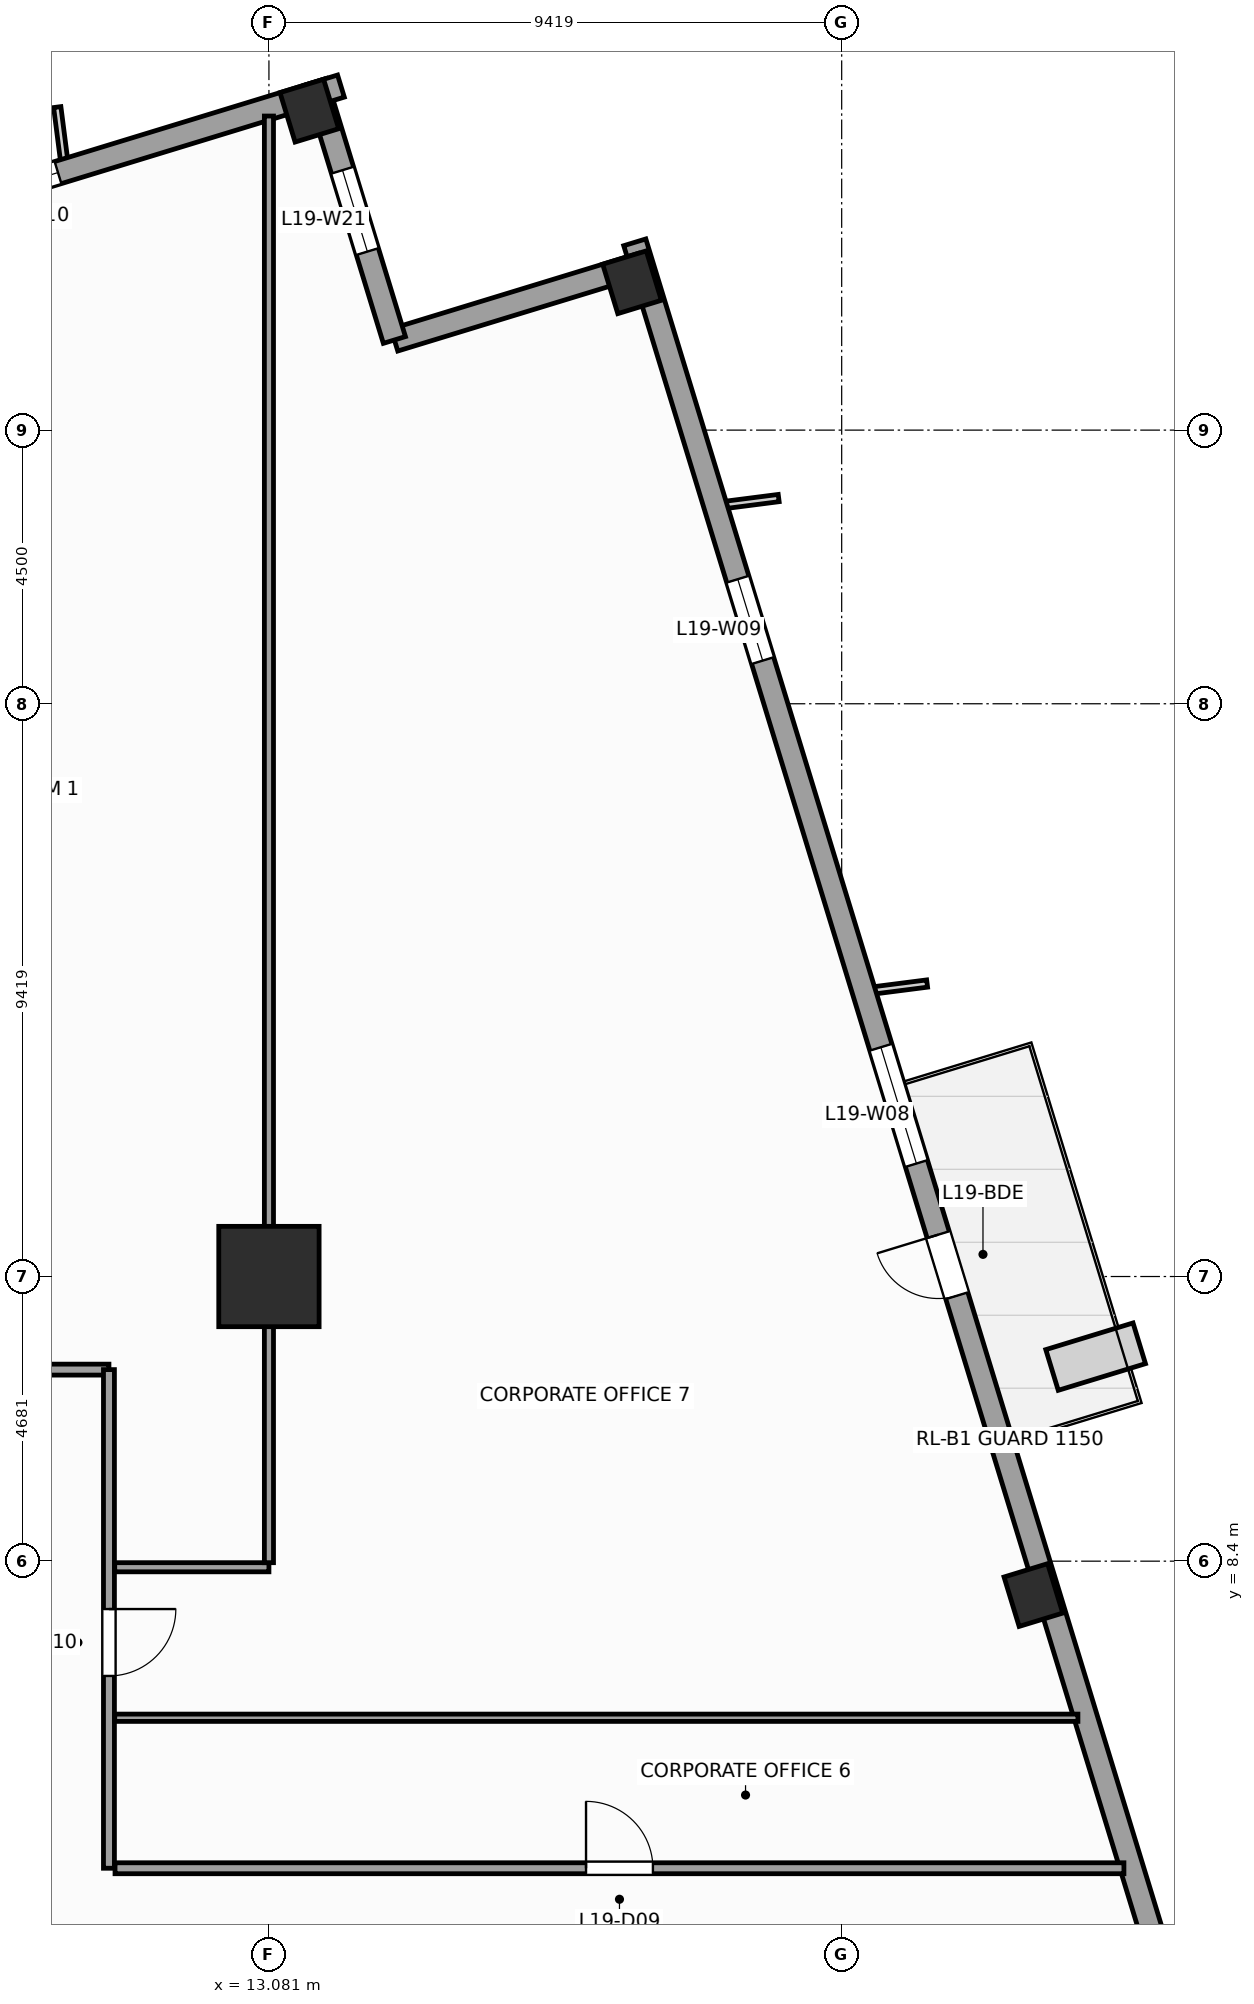
"""IFC4 building model, lengths in metres.
Left out: names, types, materials, properties, quantities, classifications, styles, units other than length and angle.
Written with IfcOpenShell. Run it as: python <this file> out.ifc"""

import sys

from ifc_helpers import new_model, si_unit, direction, frame, frame_2d, origin, origin_2d, place, context, subcontext, project, spatial, rectangle, extrude, source, transform, mapped, element, fill, save


model = new_model("IFC4")
c1 = context("Model", 3, precision=1e-05, world=origin(), true_north=direction((0.0, 1.0)))
c2 = subcontext(c1, "Body", "Model", "MODEL_VIEW")
j1 = project(units=[si_unit("LENGTHUNIT", "METRE"), si_unit("PLANEANGLEUNIT", "RADIAN")], contexts=[c1])
p1 = place(None, origin())
s1 = spatial("IfcSite", under=j1, at=p1, CompositionType="ELEMENT")
p2 = place(p1, origin())
s2 = spatial("IfcBuilding", under=s1, at=p2, CompositionType="ELEMENT")
p3 = place(p2, frame((0.0, 0.0, 83.2)))
s3 = spatial("IfcBuildingStorey", under=s2, at=p3, CompositionType="ELEMENT", Elevation=83.2)
m1 = source(origin(), c2, "Body", "SweptSolid", [
    extrude(rectangle(XDim=1.65, YDim=1.65, at=origin_2d()), origin(), (0.0, 0.0, 1.0), 4.0),
])
p4 = place(p3, frame((13.081, 13.081, 0.0), z_axis=(0.0, 0.0, 1.0), x_axis=(1.0, 0.0, 0.0)))
e1 = element("IfcColumn", 1, at=p4, inside=s3, PredefinedType="COLUMN", context=c2, shape_type="MappedRepresentation", body=[
    mapped(m1, transform((0.0, 0.0, 0.0), scale=1.0)),
])
m2 = source(origin(), c2, "Body", "SweptSolid", [
    extrude(rectangle(XDim=0.75, YDim=0.85, at=origin_2d()), origin(), (0.0, 0.0, 1.0), 4.0),
])
for number, where, z_axis, x_axis in (
    (2, (25.653, 7.843, 0.0), (0.0, 0.0, 1.0), (0.956, 0.292, 0.0)),
    (3, (19.052, 29.431, 0.0), (0.0, 0.0, 1.0), (0.956, 0.292, 0.0)),
    (4, (13.746, 32.253, 0.0), (0.0, 0.0, 1.0), (0.956, 0.292, 0.0)),
):
    element("IfcColumn", number, at=place(p3, frame(where, z_axis=z_axis, x_axis=x_axis)), inside=s3, PredefinedType="COLUMN", context=c2, shape_type="MappedRepresentation", body=[
        mapped(m2, transform((0.0, 0.0, 0.0), scale=1.0)),
    ])
p5 = place(p3, frame((32.658, -14.265, 0.0), z_axis=(0.0, 0.0, 1.0), x_axis=(-0.292373127906, 0.956304320851, 0.0)))
e5 = element("IfcWall", 5, at=p5, inside=s3, PredefinedType="STANDARD", context=c2, shape_type="SweptSolid", body=[
    extrude(rectangle(XDim=46.38, YDim=0.38, at=frame_2d((23.19, 0.0))), origin(), (0.0, 0.0, 1.0), 3.14),
])
p6 = place(p5, frame((28.265, 0.0, 0.0)))
e6 = element("IfcOpeningElement", 6, at=p6, cuts=e5, PredefinedType="OPENING", context=c2, shape_type="SweptSolid", body=[
    extrude(rectangle(XDim=1.05, YDim=2.25, at=frame_2d((0.525, 1.125))), frame((0.0, 0.2, 0.0), z_axis=(0.0, -1.0, 0.0), x_axis=(1.0, 0.0, 0.0)), (0.0, 0.0, 1.0), 0.4),
])
p7 = place(p5, frame((4.865, 0.0, 0.51)))
e7 = element("IfcOpeningElement", 7, at=p7, cuts=e5, PredefinedType="OPENING", context=c2, shape_type="SweptSolid", body=[
    extrude(rectangle(XDim=1.4, YDim=2.4, at=frame_2d((0.7, 1.2))), frame((0.0, 0.2, 0.0), z_axis=(0.0, -1.0, 0.0), x_axis=(1.0, 0.0, 0.0)), (0.0, 0.0, 1.0), 0.4),
])
p8 = place(p5, frame((12.45, 0.0, 0.51)))
e8 = element("IfcOpeningElement", 8, at=p8, cuts=e5, PredefinedType="OPENING", context=c2, shape_type="SweptSolid", body=[
    extrude(rectangle(XDim=2.0, YDim=2.4, at=frame_2d((1.0, 1.2))), frame((0.0, 0.2, 0.0), z_axis=(0.0, -1.0, 0.0), x_axis=(1.0, 0.0, 0.0)), (0.0, 0.0, 1.0), 0.4),
])
p9 = place(p5, frame((30.538, 0.0, 0.51)))
e9 = element("IfcOpeningElement", 9, at=p9, cuts=e5, PredefinedType="OPENING", context=c2, shape_type="SweptSolid", body=[
    extrude(rectangle(XDim=2.0, YDim=2.4, at=frame_2d((1.0, 1.2))), frame((0.0, 0.2, 0.0), z_axis=(0.0, -1.0, 0.0), x_axis=(1.0, 0.0, 0.0)), (0.0, 0.0, 1.0), 0.4),
])
p10 = place(p5, frame((39.187, 0.0, 0.51)))
e10 = element("IfcOpeningElement", 10, at=p10, cuts=e5, PredefinedType="OPENING", context=c2, shape_type="SweptSolid", body=[
    extrude(rectangle(XDim=1.4, YDim=2.4, at=frame_2d((0.7, 1.2))), frame((0.0, 0.2, 0.0), z_axis=(0.0, -1.0, 0.0), x_axis=(1.0, 0.0, 0.0)), (0.0, 0.0, 1.0), 0.4),
])
p11 = place(p3, frame((19.208, 29.725, 0.0), z_axis=(0.0, 0.0, 1.0), x_axis=(-0.956312764915, -0.292345507338, 0.0)))
e11 = element("IfcWall", 11, at=p11, inside=s3, PredefinedType="STANDARD", context=c2, shape_type="SweptSolid", body=[
    extrude(rectangle(XDim=4.25, YDim=0.38, at=frame_2d((2.125, 0.0))), origin(), (0.0, 0.0, 1.0), 3.74),
])
p12 = place(p3, frame((15.144, 28.482, 0.0), z_axis=(0.0, 0.0, 1.0), x_axis=(-0.292373601522, 0.956304176051, 0.0)))
e12 = element("IfcWall", 12, at=p12, inside=s3, PredefinedType="STANDARD", context=c2, shape_type="SweptSolid", body=[
    extrude(rectangle(XDim=4.44, YDim=0.38, at=frame_2d((2.22, 0.0))), origin(), (0.0, 0.0, 1.0), 3.04),
])
p13 = place(p12, frame((1.52, 0.0, 0.51)))
e13 = element("IfcOpeningElement", 13, at=p13, cuts=e12, PredefinedType="OPENING", context=c2, shape_type="SweptSolid", body=[
    extrude(rectangle(XDim=1.4, YDim=2.4, at=frame_2d((0.7, 1.2))), frame((0.0, 0.2, 0.0), z_axis=(0.0, -1.0, 0.0), x_axis=(1.0, 0.0, 0.0)), (0.0, 0.0, 1.0), 0.4),
])
p14 = place(p3, frame((14.265, 32.658, 0.0), z_axis=(0.0, 0.0, 1.0), x_axis=(-0.956304320851, -0.292373127906, 0.0)))
e14 = element("IfcWall", 14, at=p14, inside=s3, PredefinedType="STANDARD", context=c2, shape_type="SweptSolid", body=[
    extrude(rectangle(XDim=46.38, YDim=0.38, at=frame_2d((23.19, 0.0))), origin(), (0.0, 0.0, 1.0), 3.14),
])
p15 = place(p14, frame((4.865, 0.0, 0.51)))
e15 = element("IfcOpeningElement", 15, at=p15, cuts=e14, PredefinedType="OPENING", context=c2, shape_type="SweptSolid", body=[
    extrude(rectangle(XDim=1.4, YDim=2.4, at=frame_2d((0.7, 1.2))), frame((0.0, 0.2, 0.0), z_axis=(0.0, -1.0, 0.0), x_axis=(1.0, 0.0, 0.0)), (0.0, 0.0, 1.0), 0.4),
])
p16 = place(p14, frame((12.45, 0.0, 0.51)))
e16 = element("IfcOpeningElement", 16, at=p16, cuts=e14, PredefinedType="OPENING", context=c2, shape_type="SweptSolid", body=[
    extrude(rectangle(XDim=2.0, YDim=2.4, at=frame_2d((1.0, 1.2))), frame((0.0, 0.2, 0.0), z_axis=(0.0, -1.0, 0.0), x_axis=(1.0, 0.0, 0.0)), (0.0, 0.0, 1.0), 0.4),
])
p17 = place(p14, frame((19.012, 0.0, 0.51)))
e17 = element("IfcOpeningElement", 17, at=p17, cuts=e14, PredefinedType="OPENING", context=c2, shape_type="SweptSolid", body=[
    extrude(rectangle(XDim=2.0, YDim=2.4, at=frame_2d((1.0, 1.2))), frame((0.0, 0.2, 0.0), z_axis=(0.0, -1.0, 0.0), x_axis=(1.0, 0.0, 0.0)), (0.0, 0.0, 1.0), 0.4),
])
p18 = place(p14, frame((30.538, 0.0, 0.51)))
e18 = element("IfcOpeningElement", 18, at=p18, cuts=e14, PredefinedType="OPENING", context=c2, shape_type="SweptSolid", body=[
    extrude(rectangle(XDim=2.0, YDim=2.4, at=frame_2d((1.0, 1.2))), frame((0.0, 0.2, 0.0), z_axis=(0.0, -1.0, 0.0), x_axis=(1.0, 0.0, 0.0)), (0.0, 0.0, 1.0), 0.4),
])
p19 = place(p14, frame((39.187, 0.0, 0.51)))
e19 = element("IfcOpeningElement", 19, at=p19, cuts=e14, PredefinedType="OPENING", context=c2, shape_type="SweptSolid", body=[
    extrude(rectangle(XDim=1.4, YDim=2.4, at=frame_2d((0.7, 1.2))), frame((0.0, 0.2, 0.0), z_axis=(0.0, -1.0, 0.0), x_axis=(1.0, 0.0, 0.0)), (0.0, 0.0, 1.0), 0.4),
])
p20 = place(p3, frame((-12.6, 11.55, 0.0), z_axis=(0.0, 0.0, 1.0), x_axis=(1.0, 0.0, 0.0)))
e20 = element("IfcWall", 20, at=p20, inside=s3, PredefinedType="PARTITIONING", context=c2, shape_type="SweptSolid", body=[
    extrude(rectangle(XDim=23.05, YDim=0.18, at=frame_2d((11.525, 0.0))), origin(), (0.0, 0.0, 1.0), 3.74),
])
p21 = place(p20, frame((2.514, 0.0, 0.0)))
e21 = element("IfcOpeningElement", 21, at=p21, cuts=e20, PredefinedType="OPENING", context=c2, shape_type="SweptSolid", body=[
    extrude(rectangle(XDim=1.1, YDim=2.2, at=frame_2d((0.55, 1.1))), frame((0.0, 0.1, 0.0), z_axis=(0.0, -1.0, 0.0), x_axis=(1.0, 0.0, 0.0)), (0.0, 0.0, 1.0), 0.2),
])
p22 = place(p20, frame((8.05, 0.0, 0.0)))
e22 = element("IfcOpeningElement", 22, at=p22, cuts=e20, PredefinedType="OPENING", context=c2, shape_type="SweptSolid", body=[
    extrude(rectangle(XDim=1.1, YDim=2.2, at=frame_2d((0.55, 1.1))), frame((0.0, 0.1, 0.0), z_axis=(0.0, -1.0, 0.0), x_axis=(1.0, 0.0, 0.0)), (0.0, 0.0, 1.0), 0.2),
])
p23 = place(p20, frame((13.65, 0.0, 0.0)))
e23 = element("IfcOpeningElement", 23, at=p23, cuts=e20, PredefinedType="OPENING", context=c2, shape_type="SweptSolid", body=[
    extrude(rectangle(XDim=1.1, YDim=2.2, at=frame_2d((0.55, 1.1))), frame((0.0, 0.1, 0.0), z_axis=(0.0, -1.0, 0.0), x_axis=(1.0, 0.0, 0.0)), (0.0, 0.0, 1.0), 0.2),
])
p24 = place(p20, frame((19.311, 0.0, 0.0)))
e24 = element("IfcOpeningElement", 24, at=p24, cuts=e20, PredefinedType="OPENING", context=c2, shape_type="SweptSolid", body=[
    extrude(rectangle(XDim=1.1, YDim=2.2, at=frame_2d((0.55, 1.1))), frame((0.0, 0.1, 0.0), z_axis=(0.0, -1.0, 0.0), x_axis=(1.0, 0.0, 0.0)), (0.0, 0.0, 1.0), 0.2),
])
p25 = place(p3, frame((10.45, 3.35, 0.0), z_axis=(0.0, 0.0, 1.0), x_axis=(0.0, 1.0, 0.0)))
e25 = element("IfcWall", 25, at=p25, inside=s3, PredefinedType="PARTITIONING", context=c2, shape_type="SweptSolid", body=[
    extrude(rectangle(XDim=8.2, YDim=0.18, at=frame_2d((4.1, 0.0))), origin(), (0.0, 0.0, 1.0), 3.74),
])
p26 = place(p25, frame((3.163, 0.0, 0.0)))
e26 = element("IfcOpeningElement", 26, at=p26, cuts=e25, PredefinedType="OPENING", context=c2, shape_type="SweptSolid", body=[
    extrude(rectangle(XDim=1.1, YDim=2.2, at=frame_2d((0.55, 1.1))), frame((0.0, 0.1, 0.0), z_axis=(0.0, -1.0, 0.0), x_axis=(1.0, 0.0, 0.0)), (0.0, 0.0, 1.0), 0.2),
])
p27 = place(p3, frame((10.55, 3.35, 0.0), z_axis=(0.0, 0.0, 1.0), x_axis=(1.0, 0.0, 0.0)))
e27 = element("IfcWall", 27, at=p27, inside=s3, PredefinedType="PARTITIONING", context=c2, shape_type="SweptSolid", body=[
    extrude(rectangle(XDim=16.592, YDim=0.18, at=frame_2d((8.296, 0.0))), origin(), (0.0, 0.0, 1.0), 3.74),
])
p28 = place(p27, frame((7.746, 0.0, 0.0)))
e28 = element("IfcOpeningElement", 28, at=p28, cuts=e27, PredefinedType="OPENING", context=c2, shape_type="SweptSolid", body=[
    extrude(rectangle(XDim=1.1, YDim=2.2, at=frame_2d((0.55, 1.1))), frame((0.0, 0.1, 0.0), z_axis=(0.0, -1.0, 0.0), x_axis=(1.0, 0.0, 0.0)), (0.0, 0.0, 1.0), 0.2),
])
p29 = place(p3, frame((10.545, 8.3, 0.0), z_axis=(0.0, 0.0, 1.0), x_axis=(1.0, 0.0, 0.0)))
e29 = element("IfcWall", 29, at=p29, inside=s3, PredefinedType="PARTITIONING", context=c2, shape_type="SweptSolid", body=[
    extrude(rectangle(XDim=2.536, YDim=0.15, at=frame_2d((1.268, 0.0))), origin(), (0.0, 0.0, 1.0), 3.74),
])
p30 = place(p3, frame((13.081, 8.375, 0.0), z_axis=(0.0, 0.0, 1.0), x_axis=(0.0, 1.0, 0.0)))
e30 = element("IfcWall", 30, at=p30, inside=s3, PredefinedType="PARTITIONING", context=c2, shape_type="SweptSolid", body=[
    extrude(rectangle(XDim=23.79, YDim=0.15, at=frame_2d((11.895, 0.0))), origin(), (0.0, 0.0, 1.0), 2.732),
])
p31 = place(p3, frame((10.545, 5.825, 0.0), z_axis=(0.0, 0.0, 1.0), x_axis=(1.0, 0.0, 0.0)))
e31 = element("IfcWall", 31, at=p31, inside=s3, PredefinedType="PARTITIONING", context=c2, shape_type="SweptSolid", body=[
    extrude(rectangle(XDim=15.84, YDim=0.12, at=frame_2d((7.92, 0.0))), origin(), (0.0, 0.0, 1.0), 3.74),
])
m3 = source(origin(), c2, "Body", "SweptSolid", [
    extrude(rectangle(XDim=1.05, YDim=2.25, at=frame_2d((0.525, 1.125))), frame((0.0, 0.025, 0.0), z_axis=(0.0, -1.0, 0.0), x_axis=(1.0, 0.0, 0.0)), (0.0, 0.0, 1.0), 0.05),
])
p32 = place(p6, origin())
e32 = element("IfcDoor", 32, at=p32, inside=s3, OperationType="SINGLE_SWING_RIGHT", PredefinedType="DOOR", context=c2, shape_type="MappedRepresentation", body=[
    mapped(m3, transform((0.0, 0.0, 0.0), scale=1.0)),
])
fill(e6, e32)
m4 = source(origin(), c2, "Body", "SweptSolid", [
    extrude(rectangle(XDim=2.0, YDim=2.4, at=frame_2d((1.0, 1.2))), frame((0.0, 0.03, 0.0), z_axis=(0.0, -1.0, 0.0), x_axis=(1.0, 0.0, 0.0)), (0.0, 0.0, 1.0), 0.06),
])
p33 = place(p9, origin())
e33 = element("IfcWindow", 33, at=p33, inside=s3, PartitioningType="SINGLE_PANEL", PredefinedType="WINDOW", context=c2, shape_type="MappedRepresentation", body=[
    mapped(m4, transform((0.0, 0.0, 0.0), scale=1.0)),
])
fill(e9, e33)
m5 = source(origin(), c2, "Body", "SweptSolid", [
    extrude(rectangle(XDim=1.4, YDim=2.4, at=frame_2d((0.7, 1.2))), frame((0.0, 0.03, 0.0), z_axis=(0.0, -1.0, 0.0), x_axis=(1.0, 0.0, 0.0)), (0.0, 0.0, 1.0), 0.06),
])
p34 = place(p10, origin())
e34 = element("IfcWindow", 34, at=p34, inside=s3, PartitioningType="SINGLE_PANEL", PredefinedType="WINDOW", context=c2, shape_type="MappedRepresentation", body=[
    mapped(m5, transform((0.0, 0.0, 0.0), scale=1.0)),
])
fill(e10, e34)
p35 = place(p15, origin())
e35 = element("IfcWindow", 35, at=p35, inside=s3, PartitioningType="SINGLE_PANEL", PredefinedType="WINDOW", context=c2, shape_type="MappedRepresentation", body=[
    mapped(m5, transform((0.0, 0.0, 0.0), scale=1.0)),
])
fill(e15, e35)
p36 = place(p13, origin())
e36 = element("IfcWindow", 36, at=p36, inside=s3, PartitioningType="SINGLE_PANEL", PredefinedType="WINDOW", context=c2, shape_type="MappedRepresentation", body=[
    mapped(m5, transform((0.0, 0.0, 0.0), scale=1.0)),
])
fill(e13, e36)
m6 = source(origin(), c2, "Body", "SweptSolid", [
    extrude(rectangle(XDim=1.1, YDim=2.2, at=frame_2d((0.55, 1.1))), frame((0.0, 0.025, 0.0), z_axis=(0.0, -1.0, 0.0), x_axis=(1.0, 0.0, 0.0)), (0.0, 0.0, 1.0), 0.05),
])
p37 = place(p28, origin())
e37 = element("IfcDoor", 37, at=p37, inside=s3, OperationType="SINGLE_SWING_LEFT", PredefinedType="DOOR", context=c2, shape_type="MappedRepresentation", body=[
    mapped(m6, transform((0.0, 0.0, 0.0), scale=1.0)),
])
fill(e28, e37)
p38 = place(p26, frame((1.1, 0.0, 0.0), z_axis=(0.0, 0.0, 1.0), x_axis=(-1.0, 0.0, 0.0)))
e38 = element("IfcDoor", 38, at=p38, inside=s3, OperationType="SINGLE_SWING_RIGHT", PredefinedType="DOOR", context=c2, shape_type="MappedRepresentation", body=[
    mapped(m6, transform((0.0, 0.0, 0.0), scale=1.0)),
])
fill(e26, e38)
save(model, sys.argv[1])
